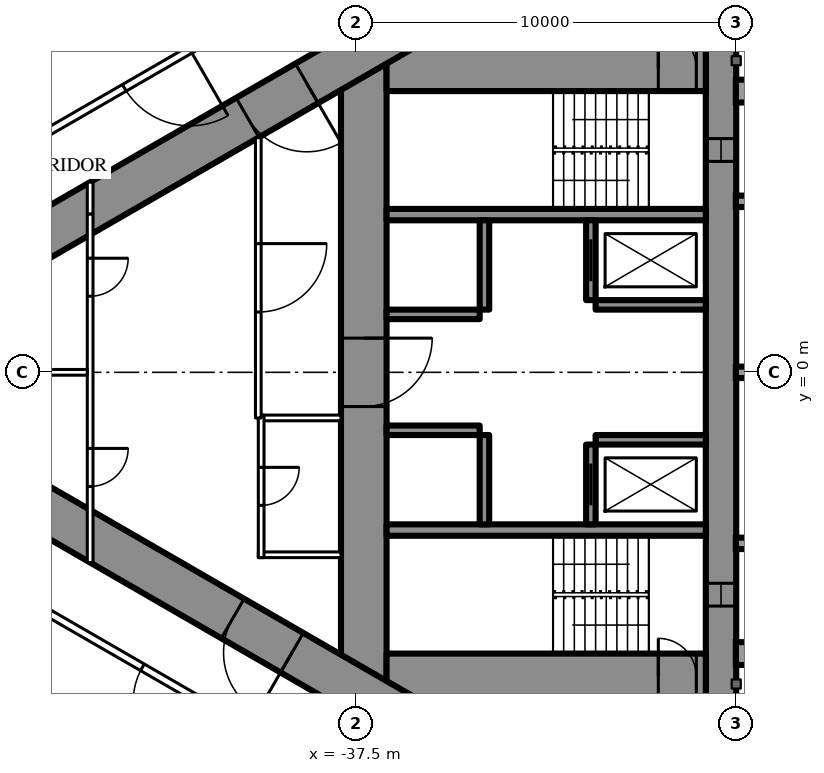
"""IFC4 building model, lengths in metres.
Left out: names, types, materials, properties, quantities, classifications, styles, units other than length and angle.
Written with IfcOpenShell. Run it as: python <this file> out.ifc"""

import sys

from ifc_helpers import new_model, si_unit, direction, frame, frame_2d, origin, place, context, subcontext, project, spatial, rectangle, extrude, element, fill, save


model = new_model("IFC4")
c1 = context("Model", 3, precision=1e-05, world=origin(), true_north=direction((0.0, 1.0)))
c2 = subcontext(c1, "Body", "Model", "MODEL_VIEW")
j1 = project(units=[si_unit("LENGTHUNIT", "METRE"), si_unit("PLANEANGLEUNIT", "RADIAN")], contexts=[c1])
p1 = place(None, origin())
s1 = spatial("IfcSite", under=j1, at=p1, CompositionType="ELEMENT")
p2 = place(p1, origin())
s2 = spatial("IfcBuilding", under=s1, at=p2, CompositionType="ELEMENT")
p3 = place(p2, frame((0.0, 0.0, 77.5)))
s3 = spatial("IfcBuildingStorey", under=s2, at=p3, CompositionType="ELEMENT", Elevation=77.5)
p4 = place(p3, frame((-27.9, 8.6, 0.0), z_axis=(0.0, 0.0, 1.0), x_axis=(0.0, -1.0, 0.0)))
e1 = element("IfcWall", 1, at=p4, inside=s3, PredefinedType="SHEAR", context=c2, shape_type="SweptSolid", body=[
    extrude(rectangle(XDim=17.2, YDim=0.8, at=frame_2d((8.6, 0.0))), origin(), (0.0, 0.0, 1.0), 3.5),
])
p5 = place(p4, frame((2.45, 0.0, 0.6)))
e2 = element("IfcOpeningElement", 2, at=p5, cuts=e1, PredefinedType="OPENING", context=c2, shape_type="SweptSolid", body=[
    extrude(rectangle(XDim=0.6, YDim=2.1, at=frame_2d((0.3, 1.05))), frame((0.0, 0.41, 0.0), z_axis=(0.0, -1.0, 0.0), x_axis=(1.0, 0.0, 0.0)), (0.0, 0.0, 1.0), 0.82),
])
p6 = place(p4, frame((14.15, 0.0, 0.6)))
e3 = element("IfcOpeningElement", 3, at=p6, cuts=e1, PredefinedType="OPENING", context=c2, shape_type="SweptSolid", body=[
    extrude(rectangle(XDim=0.6, YDim=2.1, at=frame_2d((0.3, 1.05))), frame((0.0, 0.41, 0.0), z_axis=(0.0, -1.0, 0.0), x_axis=(1.0, 0.0, 0.0)), (0.0, 0.0, 1.0), 0.82),
])
p7 = place(p3, frame((-37.3, 8.6, 0.0), z_axis=(0.0, 0.0, 1.0), x_axis=(0.0, -1.0, 0.0)))
e4 = element("IfcWall", 4, at=p7, inside=s3, PredefinedType="SHEAR", context=c2, shape_type="SweptSolid", body=[
    extrude(rectangle(XDim=17.2, YDim=1.2, at=frame_2d((8.6, 0.0))), origin(), (0.0, 0.0, 1.0), 3.5),
])
p8 = place(p7, frame((7.7, 0.0, 0.0)))
e5 = element("IfcOpeningElement", 5, at=p8, cuts=e4, PredefinedType="OPENING", context=c2, shape_type="SweptSolid", body=[
    extrude(rectangle(XDim=1.8, YDim=2.2, at=frame_2d((0.9, 1.1))), frame((0.0, 0.61, 0.0), z_axis=(0.0, -1.0, 0.0), x_axis=(1.0, 0.0, 0.0)), (0.0, 0.0, 1.0), 1.22),
])
p9 = place(p3, frame((-28.3, 8.0, 0.0), z_axis=(0.0, 0.0, 1.0), x_axis=(-1.0, 0.0, 0.0)))
e6 = element("IfcWall", 6, at=p9, inside=s3, PredefinedType="SHEAR", context=c2, shape_type="SweptSolid", body=[
    extrude(rectangle(XDim=8.4, YDim=1.2, at=frame_2d((4.2, 0.0))), origin(), (0.0, 0.0, 1.0), 3.5),
])
p10 = place(p9, frame((0.25, 0.0, 0.0)))
e7 = element("IfcOpeningElement", 7, at=p10, cuts=e6, PredefinedType="OPENING", context=c2, shape_type="SweptSolid", body=[
    extrude(rectangle(XDim=1.0, YDim=2.2, at=frame_2d((0.5, 1.1))), frame((0.0, 0.61, 0.0), z_axis=(0.0, -1.0, 0.0), x_axis=(1.0, 0.0, 0.0)), (0.0, 0.0, 1.0), 1.22),
])
p11 = place(p3, frame((-28.3, -8.0, 0.0), z_axis=(0.0, 0.0, 1.0), x_axis=(-1.0, 0.0, 0.0)))
e8 = element("IfcWall", 8, at=p11, inside=s3, PredefinedType="SHEAR", context=c2, shape_type="SweptSolid", body=[
    extrude(rectangle(XDim=8.4, YDim=1.2, at=frame_2d((4.2, 0.0))), origin(), (0.0, 0.0, 1.0), 3.5),
])
p12 = place(p11, frame((0.25, 0.0, 0.0)))
e9 = element("IfcOpeningElement", 9, at=p12, cuts=e8, PredefinedType="OPENING", context=c2, shape_type="SweptSolid", body=[
    extrude(rectangle(XDim=1.0, YDim=2.2, at=frame_2d((0.5, 1.1))), frame((0.0, 0.61, 0.0), z_axis=(0.0, -1.0, 0.0), x_axis=(1.0, 0.0, 0.0)), (0.0, 0.0, 1.0), 1.22),
])
for number, where, z_axis, x_axis in (
    (10, (-28.3, 4.15, 0.0), (0.0, 0.0, 1.0), (-1.0, 0.0, 0.0)),
    (11, (-28.3, -4.15, 0.0), (0.0, 0.0, 1.0), (-1.0, 0.0, 0.0)),
):
    element("IfcWall", number, at=place(p3, frame(where, z_axis=z_axis, x_axis=x_axis)), inside=s3, PredefinedType="SHEAR", context=c2, shape_type="SweptSolid", body=[
        extrude(rectangle(XDim=8.4, YDim=0.3, at=frame_2d((4.2, 0.0))), origin(), (0.0, 0.0, 1.0), 3.5),
    ])
p13 = place(p3, frame((-31.325, 4.0, 0.0), z_axis=(0.0, 0.0, 1.0), x_axis=(0.0, -1.0, 0.0)))
e12 = element("IfcWall", 12, at=p13, inside=s3, PredefinedType="SHEAR", context=c2, shape_type="SweptSolid", body=[
    extrude(rectangle(XDim=2.1, YDim=0.25, at=frame_2d((1.05, 0.0))), origin(), (0.0, 0.0, 1.0), 3.5),
])
p14 = place(p13, frame((0.5, 0.0, 0.0)))
e13 = element("IfcOpeningElement", 13, at=p14, cuts=e12, PredefinedType="OPENING", context=c2, shape_type="SweptSolid", body=[
    extrude(rectangle(XDim=1.1, YDim=2.2, at=frame_2d((0.55, 1.1))), frame((0.0, 0.135, 0.0), z_axis=(0.0, -1.0, 0.0), x_axis=(1.0, 0.0, 0.0)), (0.0, 0.0, 1.0), 0.27),
])
p15 = place(p3, frame((-34.125, 4.0, 0.0), z_axis=(0.0, 0.0, 1.0), x_axis=(0.0, -1.0, 0.0)))
e14 = element("IfcWall", 14, at=p15, inside=s3, PredefinedType="SHEAR", context=c2, shape_type="SweptSolid", body=[
    extrude(rectangle(XDim=2.35, YDim=0.25, at=frame_2d((1.175, 0.0))), origin(), (0.0, 0.0, 1.0), 3.5),
])
p16 = place(p3, frame((-28.3, 1.775, 0.0), z_axis=(0.0, 0.0, 1.0), x_axis=(-1.0, 0.0, 0.0)))
e15 = element("IfcWall", 15, at=p16, inside=s3, PredefinedType="SHEAR", context=c2, shape_type="SweptSolid", body=[
    extrude(rectangle(XDim=2.9, YDim=0.25, at=frame_2d((1.45, 0.0))), origin(), (0.0, 0.0, 1.0), 3.5),
])
p17 = place(p3, frame((-34.25, 1.525, 0.0), z_axis=(0.0, 0.0, 1.0), x_axis=(-1.0, 0.0, 0.0)))
e16 = element("IfcWall", 16, at=p17, inside=s3, PredefinedType="SHEAR", context=c2, shape_type="SweptSolid", body=[
    extrude(rectangle(XDim=2.45, YDim=0.25, at=frame_2d((1.225, 0.0))), origin(), (0.0, 0.0, 1.0), 3.5),
])
p18 = place(p3, frame((-31.325, -1.9, 0.0), z_axis=(0.0, 0.0, 1.0), x_axis=(0.0, -1.0, 0.0)))
e17 = element("IfcWall", 17, at=p18, inside=s3, PredefinedType="SHEAR", context=c2, shape_type="SweptSolid", body=[
    extrude(rectangle(XDim=2.1, YDim=0.25, at=frame_2d((1.05, 0.0))), origin(), (0.0, 0.0, 1.0), 3.5),
])
p19 = place(p18, frame((0.5, 0.0, 0.0)))
e18 = element("IfcOpeningElement", 18, at=p19, cuts=e17, PredefinedType="OPENING", context=c2, shape_type="SweptSolid", body=[
    extrude(rectangle(XDim=1.1, YDim=2.2, at=frame_2d((0.55, 1.1))), frame((0.0, 0.135, 0.0), z_axis=(0.0, -1.0, 0.0), x_axis=(1.0, 0.0, 0.0)), (0.0, 0.0, 1.0), 0.27),
])
p20 = place(p3, frame((-34.125, -1.65, 0.0), z_axis=(0.0, 0.0, 1.0), x_axis=(0.0, -1.0, 0.0)))
e19 = element("IfcWall", 19, at=p20, inside=s3, PredefinedType="SHEAR", context=c2, shape_type="SweptSolid", body=[
    extrude(rectangle(XDim=2.35, YDim=0.25, at=frame_2d((1.175, 0.0))), origin(), (0.0, 0.0, 1.0), 3.5),
])
p21 = place(p3, frame((-28.3, -1.775, 0.0), z_axis=(0.0, 0.0, 1.0), x_axis=(-1.0, 0.0, 0.0)))
e20 = element("IfcWall", 20, at=p21, inside=s3, PredefinedType="SHEAR", context=c2, shape_type="SweptSolid", body=[
    extrude(rectangle(XDim=2.9, YDim=0.25, at=frame_2d((1.45, 0.0))), origin(), (0.0, 0.0, 1.0), 3.5),
])
p22 = place(p3, frame((-34.25, -1.525, 0.0), z_axis=(0.0, 0.0, 1.0), x_axis=(-1.0, 0.0, 0.0)))
e21 = element("IfcWall", 21, at=p22, inside=s3, PredefinedType="SHEAR", context=c2, shape_type="SweptSolid", body=[
    extrude(rectangle(XDim=2.45, YDim=0.25, at=frame_2d((1.225, 0.0))), origin(), (0.0, 0.0, 1.0), 3.5),
])
p23 = place(p3, frame((-27.2, 14.3, 0.0), z_axis=(0.0, 0.0, 1.0), x_axis=(-0.866026593062, -0.499997940104, 0.0)))
e22 = element("IfcWall", 22, at=p23, inside=s3, PredefinedType="SHEAR", context=c2, shape_type="SweptSolid", body=[
    extrude(rectangle(XDim=28.946, YDim=1.2, at=frame_2d((14.473, 0.0))), origin(), (0.0, 0.0, 1.0), 3.5),
])
p24 = place(p23, frame((5.85, 0.0, 0.0)))
e23 = element("IfcOpeningElement", 23, at=p24, cuts=e22, PredefinedType="OPENING", context=c2, shape_type="SweptSolid", body=[
    extrude(rectangle(XDim=1.0, YDim=2.2, at=frame_2d((0.5, 1.1))), frame((0.0, 0.61, 0.0), z_axis=(0.0, -1.0, 0.0), x_axis=(1.0, 0.0, 0.0)), (0.0, 0.0, 1.0), 1.22),
])
p25 = place(p23, frame((13.395, 0.0, 0.0)))
e24 = element("IfcOpeningElement", 24, at=p25, cuts=e22, PredefinedType="OPENING", context=c2, shape_type="SweptSolid", body=[
    extrude(rectangle(XDim=1.8, YDim=2.04, at=frame_2d((0.9, 1.02))), frame((0.0, 0.61, 0.0), z_axis=(0.0, -1.0, 0.0), x_axis=(1.0, 0.0, 0.0)), (0.0, 0.0, 1.0), 1.22),
])
p26 = place(p3, frame((-27.2, -14.3, 0.0), z_axis=(0.0, 0.0, 1.0), x_axis=(-0.866024021859, 0.500002393557, 0.0)))
e25 = element("IfcWall", 25, at=p26, inside=s3, PredefinedType="SHEAR", context=c2, shape_type="SweptSolid", body=[
    extrude(rectangle(XDim=27.907, YDim=1.2, at=frame_2d((13.954, 0.0))), origin(), (0.0, 0.0, 1.0), 3.5),
])
p27 = place(p26, frame((4.6, 0.0, 0.0)))
e26 = element("IfcOpeningElement", 26, at=p27, cuts=e25, PredefinedType="OPENING", context=c2, shape_type="SweptSolid", body=[
    extrude(rectangle(XDim=1.0, YDim=2.2, at=frame_2d((0.5, 1.1))), frame((0.0, 0.61, 0.0), z_axis=(0.0, -1.0, 0.0), x_axis=(1.0, 0.0, 0.0)), (0.0, 0.0, 1.0), 1.22),
])
p28 = place(p26, frame((13.845, 0.0, 0.0)))
e27 = element("IfcOpeningElement", 27, at=p28, cuts=e25, PredefinedType="OPENING", context=c2, shape_type="SweptSolid", body=[
    extrude(rectangle(XDim=1.8, YDim=2.2, at=frame_2d((0.9, 1.1))), frame((0.0, 0.61, 0.0), z_axis=(0.0, -1.0, 0.0), x_axis=(1.0, 0.0, 0.0)), (0.0, 0.0, 1.0), 1.22),
])
p29 = place(p3, frame((-37.7, 10.894, 0.0), z_axis=(0.0, 0.0, 1.0), x_axis=(-0.866027905338, -0.499995667157, 0.0)))
e28 = element("IfcWall", 28, at=p29, inside=s3, PredefinedType="PARTITIONING", context=c2, shape_type="SweptSolid", body=[
    extrude(rectangle(XDim=21.787, YDim=0.2, at=frame_2d((10.894, 0.0))), origin(), (0.0, 0.0, 1.0), 3.25),
])
p30 = place(p29, frame((14.644, 0.0, 0.0)))
e29 = element("IfcOpeningElement", 29, at=p30, cuts=e28, PredefinedType="OPENING", context=c2, shape_type="SweptSolid", body=[
    extrude(rectangle(XDim=1.8, YDim=2.2, at=frame_2d((0.9, 1.1))), frame((0.0, 0.11, 0.0), z_axis=(0.0, -1.0, 0.0), x_axis=(1.0, 0.0, 0.0)), (0.0, 0.0, 1.0), 0.22),
])
p31 = place(p29, frame((19.958, 0.0, 0.0)))
e30 = element("IfcOpeningElement", 30, at=p31, cuts=e28, PredefinedType="OPENING", context=c2, shape_type="SweptSolid", body=[
    extrude(rectangle(XDim=1.329, YDim=2.04, at=frame_2d((0.665, 1.02))), frame((0.0, 0.11, 0.0), z_axis=(0.0, -1.0, 0.0), x_axis=(1.0, 0.0, 0.0)), (0.0, 0.0, 1.0), 0.22),
])
p32 = place(p29, frame((4.815, 0.0, 0.0)))
e31 = element("IfcOpeningElement", 31, at=p32, cuts=e28, PredefinedType="OPENING", context=c2, shape_type="SweptSolid", body=[
    extrude(rectangle(XDim=2.0, YDim=2.4, at=frame_2d((1.0, 1.2))), frame((0.0, 0.11, 0.0), z_axis=(0.0, -1.0, 0.0), x_axis=(1.0, 0.0, 0.0)), (0.0, 0.0, 1.0), 0.22),
])
p33 = place(p3, frame((-36.92, -11.344, 0.0), z_axis=(0.0, 0.0, 1.0), x_axis=(-0.866028313256, 0.499994960614, 0.0)))
e32 = element("IfcWall", 32, at=p33, inside=s3, PredefinedType="PARTITIONING", context=c2, shape_type="SweptSolid", body=[
    extrude(rectangle(XDim=22.568, YDim=0.2, at=frame_2d((11.284, 0.0))), origin(), (0.0, 0.0, 1.0), 3.25),
])
p34 = place(p33, frame((20.808, 0.0, 0.0)))
e33 = element("IfcOpeningElement", 33, at=p34, cuts=e32, PredefinedType="OPENING", context=c2, shape_type="SweptSolid", body=[
    extrude(rectangle(XDim=1.209, YDim=2.2, at=frame_2d((0.604, 1.1))), frame((0.0, 0.11, 0.0), z_axis=(0.0, -1.0, 0.0), x_axis=(1.0, 0.0, 0.0)), (0.0, 0.0, 1.0), 0.22),
])
p35 = place(p33, frame((15.544, 0.0, 0.0)))
e34 = element("IfcOpeningElement", 34, at=p35, cuts=e32, PredefinedType="OPENING", context=c2, shape_type="SweptSolid", body=[
    extrude(rectangle(XDim=1.8, YDim=2.2, at=frame_2d((0.9, 1.1))), frame((0.0, 0.11, 0.0), z_axis=(0.0, -1.0, 0.0), x_axis=(1.0, 0.0, 0.0)), (0.0, 0.0, 1.0), 0.22),
])
p36 = place(p33, frame((5.365, 0.0, 0.0)))
e35 = element("IfcOpeningElement", 35, at=p36, cuts=e32, PredefinedType="OPENING", context=c2, shape_type="SweptSolid", body=[
    extrude(rectangle(XDim=1.8, YDim=2.2, at=frame_2d((0.9, 1.1))), frame((0.0, 0.11, 0.0), z_axis=(0.0, -1.0, 0.0), x_axis=(1.0, 0.0, 0.0)), (0.0, 0.0, 1.0), 0.22),
])
for number, where, z_axis, x_axis in (
    (36, (-37.9, -1.2, 0.0), (0.0, 0.0, 1.0), (-1.0, 0.0, 0.0)),
    (37, (-37.9, -4.8, 0.0), (0.0, 0.0, 1.0), (-1.0, 0.0, 0.0)),
):
    element("IfcWall", number, at=place(p3, frame(where, z_axis=z_axis, x_axis=x_axis)), inside=s3, PredefinedType="PARTITIONING", context=c2, shape_type="SweptSolid", body=[
        extrude(rectangle(XDim=2.175, YDim=0.15, at=frame_2d((1.087, 0.0))), origin(), (0.0, 0.0, 1.0), 3.25),
    ])
p37 = place(p3, frame((-40.0, -1.125, 0.0), z_axis=(0.0, 0.0, 1.0), x_axis=(0.0, -1.0, 0.0)))
e38 = element("IfcWall", 38, at=p37, inside=s3, PredefinedType="PARTITIONING", context=c2, shape_type="SweptSolid", body=[
    extrude(rectangle(XDim=3.75, YDim=0.15, at=frame_2d((1.875, 0.0))), origin(), (0.0, 0.0, 1.0), 3.25),
])
p38 = place(p37, frame((1.375, 0.0, 0.0)))
e39 = element("IfcOpeningElement", 39, at=p38, cuts=e38, PredefinedType="OPENING", context=c2, shape_type="SweptSolid", body=[
    extrude(rectangle(XDim=1.0, YDim=2.2, at=frame_2d((0.5, 1.1))), frame((0.0, 0.085, 0.0), z_axis=(0.0, -1.0, 0.0), x_axis=(1.0, 0.0, 0.0)), (0.0, 0.0, 1.0), 0.17),
])
p39 = place(p3, frame((-40.075, 6.174, 0.0), z_axis=(0.0, 0.0, 1.0), x_axis=(0.0, -1.0, 0.0)))
e40 = element("IfcWall", 40, at=p39, inside=s3, PredefinedType="PARTITIONING", context=c2, shape_type="SweptSolid", body=[
    extrude(rectangle(XDim=7.374, YDim=0.15, at=frame_2d((3.687, 0.0))), origin(), (0.0, 0.0, 1.0), 3.25),
])
p40 = place(p39, frame((2.787, 0.0, 0.0)))
e41 = element("IfcOpeningElement", 41, at=p40, cuts=e40, PredefinedType="OPENING", context=c2, shape_type="SweptSolid", body=[
    extrude(rectangle(XDim=1.8, YDim=2.2, at=frame_2d((0.9, 1.1))), frame((0.0, 0.085, 0.0), z_axis=(0.0, -1.0, 0.0), x_axis=(1.0, 0.0, 0.0)), (0.0, 0.0, 1.0), 0.17),
])
p41 = place(p3, frame((-44.5, 4.169, 0.0), z_axis=(0.0, 0.0, 1.0), x_axis=(0.0, -1.0, 0.0)))
e42 = element("IfcWall", 42, at=p41, inside=s3, PredefinedType="PARTITIONING", context=c2, shape_type="SweptSolid", body=[
    extrude(rectangle(XDim=9.173, YDim=0.15, at=frame_2d((4.587, 0.0))), origin(), (0.0, 0.0, 1.0), 3.25),
])
p42 = place(p41, frame((1.167, 0.0, 0.0)))
e43 = element("IfcOpeningElement", 43, at=p42, cuts=e42, PredefinedType="OPENING", context=c2, shape_type="SweptSolid", body=[
    extrude(rectangle(XDim=1.0, YDim=2.2, at=frame_2d((0.5, 1.1))), frame((0.0, 0.085, 0.0), z_axis=(0.0, -1.0, 0.0), x_axis=(1.0, 0.0, 0.0)), (0.0, 0.0, 1.0), 0.17),
])
p43 = place(p41, frame((6.171, 0.0, 0.0)))
e44 = element("IfcOpeningElement", 44, at=p43, cuts=e42, PredefinedType="OPENING", context=c2, shape_type="SweptSolid", body=[
    extrude(rectangle(XDim=1.0, YDim=2.2, at=frame_2d((0.5, 1.1))), frame((0.0, 0.085, 0.0), z_axis=(0.0, -1.0, 0.0), x_axis=(1.0, 0.0, 0.0)), (0.0, 0.0, 1.0), 0.17),
])
p44 = place(p3, frame((-44.575, 0.0, 0.0), z_axis=(0.0, 0.0, 1.0), x_axis=(-1.0, 0.0, 0.0)))
e45 = element("IfcWall", 45, at=p44, inside=s3, PredefinedType="PARTITIONING", context=c2, shape_type="SweptSolid", body=[
    extrude(rectangle(XDim=8.593, YDim=0.15, at=frame_2d((4.297, 0.0))), origin(), (0.0, 0.0, 1.0), 2.05),
])
p45 = place(p3, frame((-44.5, 5.005, 0.0), z_axis=(0.0, 0.0, 1.0), x_axis=(0.0, -1.0, 0.0)))
e46 = element("IfcWall", 46, at=p45, inside=s3, PredefinedType="PARTITIONING", context=c2, shape_type="SweptSolid", body=[
    extrude(rectangle(XDim=0.836, YDim=0.15, at=frame_2d((0.418, 0.0))), origin(), (0.0, 0.0, 1.0), 2.05),
])
p46 = place(p36, origin())
e47 = element("IfcDoor", 47, at=p46, inside=s3, OperationType="DOUBLE_DOOR_SINGLE_SWING", PredefinedType="DOOR", context=c2, shape_type="SweptSolid", body=[
    extrude(rectangle(XDim=1.8, YDim=2.2, at=frame_2d((0.9, 1.1))), frame((0.0, 0.025, 0.0), z_axis=(0.0, -1.0, 0.0), x_axis=(1.0, 0.0, 0.0)), (0.0, 0.0, 1.0), 0.05),
])
fill(e35, e47)
p47 = place(p32, origin())
e48 = element("IfcDoor", 48, at=p47, inside=s3, OperationType="DOUBLE_DOOR_SINGLE_SWING", PredefinedType="DOOR", context=c2, shape_type="SweptSolid", body=[
    extrude(rectangle(XDim=2.0, YDim=2.4, at=frame_2d((1.0, 1.2))), frame((0.0, 0.025, 0.0), z_axis=(0.0, -1.0, 0.0), x_axis=(1.0, 0.0, 0.0)), (0.0, 0.0, 1.0), 0.05),
])
fill(e31, e48)
p48 = place(p38, origin())
e49 = element("IfcDoor", 49, at=p48, inside=s3, OperationType="SINGLE_SWING_LEFT", PredefinedType="DOOR", context=c2, shape_type="SweptSolid", body=[
    extrude(rectangle(XDim=1.0, YDim=2.2, at=frame_2d((0.5, 1.1))), frame((0.0, 0.025, 0.0), z_axis=(0.0, -1.0, 0.0), x_axis=(1.0, 0.0, 0.0)), (0.0, 0.0, 1.0), 0.05),
])
fill(e39, e49)
p49 = place(p40, origin())
e50 = element("IfcDoor", 50, at=p49, inside=s3, OperationType="DOUBLE_DOOR_SINGLE_SWING", PredefinedType="DOOR", context=c2, shape_type="SweptSolid", body=[
    extrude(rectangle(XDim=1.8, YDim=2.2, at=frame_2d((0.9, 1.1))), frame((0.0, 0.025, 0.0), z_axis=(0.0, -1.0, 0.0), x_axis=(1.0, 0.0, 0.0)), (0.0, 0.0, 1.0), 0.05),
])
fill(e41, e50)
p50 = place(p42, origin())
e51 = element("IfcDoor", 51, at=p50, inside=s3, OperationType="SINGLE_SWING_LEFT", PredefinedType="DOOR", context=c2, shape_type="SweptSolid", body=[
    extrude(rectangle(XDim=1.0, YDim=2.2, at=frame_2d((0.5, 1.1))), frame((0.0, 0.025, 0.0), z_axis=(0.0, -1.0, 0.0), x_axis=(1.0, 0.0, 0.0)), (0.0, 0.0, 1.0), 0.05),
])
fill(e43, e51)
p51 = place(p43, origin())
e52 = element("IfcDoor", 52, at=p51, inside=s3, OperationType="SINGLE_SWING_LEFT", PredefinedType="DOOR", context=c2, shape_type="SweptSolid", body=[
    extrude(rectangle(XDim=1.0, YDim=2.2, at=frame_2d((0.5, 1.1))), frame((0.0, 0.025, 0.0), z_axis=(0.0, -1.0, 0.0), x_axis=(1.0, 0.0, 0.0)), (0.0, 0.0, 1.0), 0.05),
])
fill(e44, e52)
p52 = place(p25, origin())
e53 = element("IfcDoor", 53, at=p52, inside=s3, OperationType="DOUBLE_DOOR_SINGLE_SWING", PredefinedType="DOOR", context=c2, shape_type="SweptSolid", body=[
    extrude(rectangle(XDim=1.8, YDim=2.04, at=frame_2d((0.9, 1.02))), frame((0.0, 0.025, 0.0), z_axis=(0.0, -1.0, 0.0), x_axis=(1.0, 0.0, 0.0)), (0.0, 0.0, 1.0), 0.05),
])
fill(e24, e53)
p53 = place(p28, origin())
e54 = element("IfcDoor", 54, at=p53, inside=s3, OperationType="DOUBLE_DOOR_SINGLE_SWING", PredefinedType="DOOR", context=c2, shape_type="SweptSolid", body=[
    extrude(rectangle(XDim=1.8, YDim=2.2, at=frame_2d((0.9, 1.1))), frame((0.0, 0.025, 0.0), z_axis=(0.0, -1.0, 0.0), x_axis=(1.0, 0.0, 0.0)), (0.0, 0.0, 1.0), 0.05),
])
fill(e27, e54)
p54 = place(p8, origin())
e55 = element("IfcDoor", 55, at=p54, inside=s3, OperationType="DOUBLE_DOOR_SINGLE_SWING", PredefinedType="DOOR", context=c2, shape_type="SweptSolid", body=[
    extrude(rectangle(XDim=1.8, YDim=2.2, at=frame_2d((0.9, 1.1))), frame((0.0, 0.025, 0.0), z_axis=(0.0, -1.0, 0.0), x_axis=(1.0, 0.0, 0.0)), (0.0, 0.0, 1.0), 0.05),
])
fill(e5, e55)
p55 = place(p10, origin())
e56 = element("IfcDoor", 56, at=p55, inside=s3, OperationType="SINGLE_SWING_RIGHT", PredefinedType="DOOR", context=c2, shape_type="SweptSolid", body=[
    extrude(rectangle(XDim=1.0, YDim=2.2, at=frame_2d((0.5, 1.1))), frame((0.0, 0.025, 0.0), z_axis=(0.0, -1.0, 0.0), x_axis=(1.0, 0.0, 0.0)), (0.0, 0.0, 1.0), 0.05),
])
fill(e7, e56)
p56 = place(p12, origin())
e57 = element("IfcDoor", 57, at=p56, inside=s3, OperationType="SINGLE_SWING_RIGHT", PredefinedType="DOOR", context=c2, shape_type="SweptSolid", body=[
    extrude(rectangle(XDim=1.0, YDim=2.2, at=frame_2d((0.5, 1.1))), frame((0.0, 0.025, 0.0), z_axis=(0.0, -1.0, 0.0), x_axis=(1.0, 0.0, 0.0)), (0.0, 0.0, 1.0), 0.05),
])
fill(e9, e57)
p57 = place(p14, origin())
e58 = element("IfcDoor", 58, at=p57, inside=s3, OperationType="SLIDING_TO_LEFT", PredefinedType="USERDEFINED", context=c2, shape_type="SweptSolid", body=[
    extrude(rectangle(XDim=1.1, YDim=2.2, at=frame_2d((0.55, 1.1))), frame((0.0, 0.025, 0.0), z_axis=(0.0, -1.0, 0.0), x_axis=(1.0, 0.0, 0.0)), (0.0, 0.0, 1.0), 0.05),
])
fill(e13, e58)
p58 = place(p19, origin())
e59 = element("IfcDoor", 59, at=p58, inside=s3, OperationType="SLIDING_TO_LEFT", PredefinedType="USERDEFINED", context=c2, shape_type="SweptSolid", body=[
    extrude(rectangle(XDim=1.1, YDim=2.2, at=frame_2d((0.55, 1.1))), frame((0.0, 0.025, 0.0), z_axis=(0.0, -1.0, 0.0), x_axis=(1.0, 0.0, 0.0)), (0.0, 0.0, 1.0), 0.05),
])
fill(e18, e59)
p59 = place(p5, origin())
e60 = element("IfcWindow", 60, at=p59, inside=s3, PartitioningType="SINGLE_PANEL", PredefinedType="WINDOW", context=c2, shape_type="SweptSolid", body=[
    extrude(rectangle(XDim=0.6, YDim=2.1, at=frame_2d((0.3, 1.05))), frame((0.0, 0.03, 0.0), z_axis=(0.0, -1.0, 0.0), x_axis=(1.0, 0.0, 0.0)), (0.0, 0.0, 1.0), 0.06),
])
fill(e2, e60)
p60 = place(p6, origin())
e61 = element("IfcWindow", 61, at=p60, inside=s3, PartitioningType="SINGLE_PANEL", PredefinedType="WINDOW", context=c2, shape_type="SweptSolid", body=[
    extrude(rectangle(XDim=0.6, YDim=2.1, at=frame_2d((0.3, 1.05))), frame((0.0, 0.03, 0.0), z_axis=(0.0, -1.0, 0.0), x_axis=(1.0, 0.0, 0.0)), (0.0, 0.0, 1.0), 0.06),
])
fill(e3, e61)
save(model, sys.argv[1])
